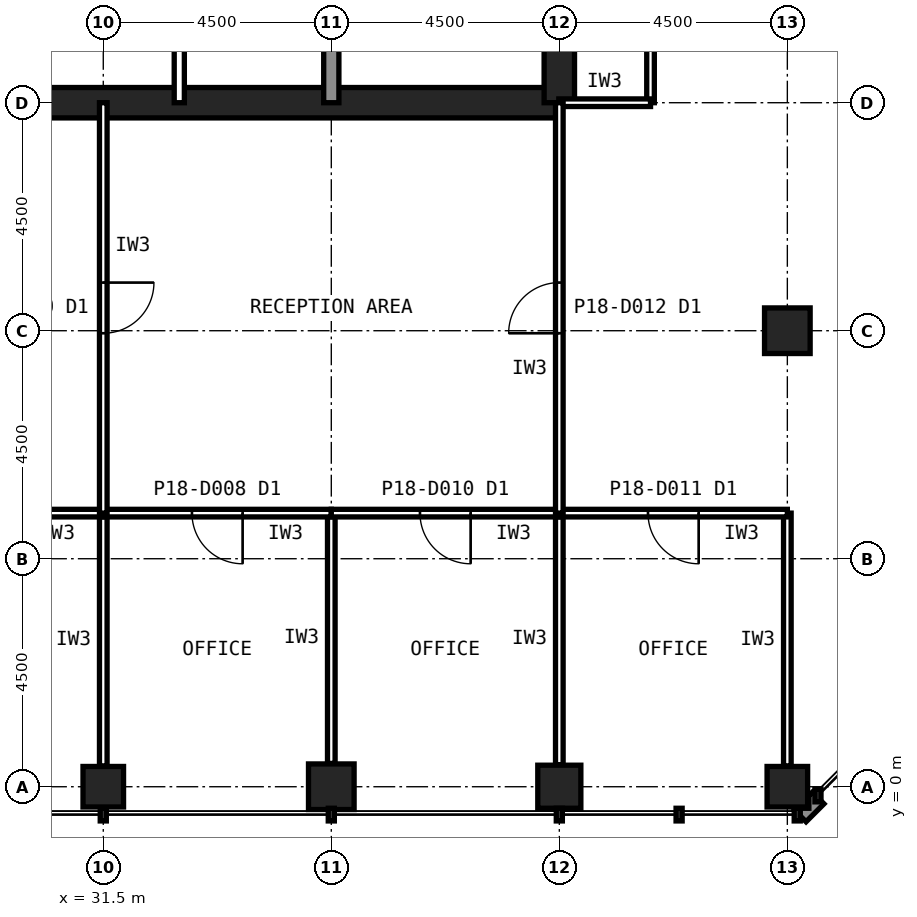
"""IFC4 building model, lengths in metres.
Left out: names, types, materials, properties, quantities, classifications, styles, units other than length and angle.
Written with IfcOpenShell. Run it as: python <this file> out.ifc"""

import sys

from ifc_helpers import new_model, si_unit, direction, frame, frame_2d, origin, origin_2d, place, context, subcontext, project, spatial, rectangle, hollow_rectangle, extrude, element, fill, save


model = new_model("IFC4")
c1 = context("Model", 3, precision=1e-05, world=origin(), true_north=direction((0.0, 1.0)))
c2 = subcontext(c1, "Body", "Model", "MODEL_VIEW")
j1 = project(units=[si_unit("LENGTHUNIT", "METRE"), si_unit("PLANEANGLEUNIT", "RADIAN")], contexts=[c1])
p1 = place(None, origin())
s1 = spatial("IfcSite", under=j1, at=p1, CompositionType="ELEMENT")
p2 = place(p1, origin())
s2 = spatial("IfcBuilding", under=s1, at=p2, CompositionType="ELEMENT")
p3 = place(p2, frame((0.0, 0.0, 79.4)))
s3 = spatial("IfcBuildingStorey", under=s2, at=p3, CompositionType="ELEMENT", Elevation=79.4)
p4 = place(p3, frame((31.5, 0.0, 0.0), z_axis=(0.0, 0.0, 1.0), x_axis=(1.0, 0.0, 0.0)))
e1 = element("IfcColumn", 1, at=p4, inside=s3, PredefinedType="COLUMN", context=c2, shape_type="SweptSolid", body=[
    extrude(hollow_rectangle(XDim=0.8, YDim=0.8, WallThickness=0.045, at=origin_2d()), origin(), (0.0, 0.0, 1.0), 4.2),
])
p5 = place(p3, frame((36.0, 0.0, 0.0), z_axis=(0.0, 0.0, 1.0), x_axis=(1.0, 0.0, 0.0)))
e2 = element("IfcColumn", 2, at=p5, inside=s3, PredefinedType="COLUMN", context=c2, shape_type="SweptSolid", body=[
    extrude(hollow_rectangle(XDim=0.9, YDim=0.9, WallThickness=0.063, at=origin_2d()), origin(), (0.0, 0.0, 1.0), 4.2),
])
p6 = place(p3, frame((40.5, 0.0, 0.0), z_axis=(0.0, 0.0, 1.0), x_axis=(1.0, 0.0, 0.0)))
e3 = element("IfcColumn", 3, at=p6, inside=s3, PredefinedType="COLUMN", context=c2, shape_type="SweptSolid", body=[
    extrude(hollow_rectangle(XDim=0.85, YDim=0.85, WallThickness=0.05, at=origin_2d()), origin(), (0.0, 0.0, 1.0), 4.2),
])
p7 = place(p3, frame((45.0, 0.0, 0.0), z_axis=(0.0, 0.0, 1.0), x_axis=(1.0, 0.0, 0.0)))
e4 = element("IfcColumn", 4, at=p7, inside=s3, PredefinedType="COLUMN", context=c2, shape_type="SweptSolid", body=[
    extrude(hollow_rectangle(XDim=0.8, YDim=0.8, WallThickness=0.045, at=origin_2d()), origin(), (0.0, 0.0, 1.0), 4.2),
])
p8 = place(p3, frame((45.0, 9.0, 0.0), z_axis=(0.0, 0.0, 1.0), x_axis=(1.0, 0.0, 0.0)))
e5 = element("IfcColumn", 5, at=p8, inside=s3, PredefinedType="COLUMN", context=c2, shape_type="SweptSolid", body=[
    extrude(hollow_rectangle(XDim=0.9, YDim=0.9, WallThickness=0.063, at=origin_2d()), origin(), (0.0, 0.0, 1.0), 4.2),
])
p9 = place(p3, frame((13.5, 13.5, 0.0), z_axis=(0.0, 0.0, 1.0), x_axis=(1.0, 0.0, 0.0)))
e6 = element("IfcWall", 6, at=p9, inside=s3, PredefinedType="SHEAR", context=c2, shape_type="SweptSolid", body=[
    extrude(rectangle(XDim=27.0, YDim=0.6, at=frame_2d((13.5, 0.0))), origin(), (0.0, 0.0, 1.0), 4.2),
])
p10 = place(p3, frame((40.5, 13.5, 0.0), z_axis=(0.0, 0.0, 1.0), x_axis=(0.0, 1.0, 0.0)))
e7 = element("IfcWall", 7, at=p10, inside=s3, PredefinedType="SHEAR", context=c2, shape_type="SweptSolid", body=[
    extrude(rectangle(XDim=27.0, YDim=0.6, at=frame_2d((13.5, 0.0))), origin(), (0.0, 0.0, 1.0), 4.2),
])
p11 = place(p10, frame((5.85, 0.0, 0.0)))
e8 = element("IfcOpeningElement", 8, at=p11, cuts=e7, PredefinedType="OPENING", context=c2, shape_type="SweptSolid", body=[
    extrude(rectangle(XDim=1.8, YDim=2.1, at=frame_2d((0.9, 1.05))), frame((0.0, 0.31, 0.0), z_axis=(0.0, -1.0, 0.0), x_axis=(1.0, 0.0, 0.0)), (0.0, 0.0, 1.0), 0.62),
])
p12 = place(p10, frame((19.65, 0.0, 0.0)))
e9 = element("IfcOpeningElement", 9, at=p12, cuts=e7, PredefinedType="OPENING", context=c2, shape_type="SweptSolid", body=[
    extrude(rectangle(XDim=1.2, YDim=2.1, at=frame_2d((0.6, 1.05))), frame((0.0, 0.31, 0.0), z_axis=(0.0, -1.0, 0.0), x_axis=(1.0, 0.0, 0.0)), (0.0, 0.0, 1.0), 0.62),
])
p13 = place(p3, frame((36.0, 13.5, 0.0), z_axis=(0.0, 0.0, 1.0), x_axis=(0.0, 1.0, 0.0)))
e10 = element("IfcWall", 10, at=p13, inside=s3, PredefinedType="SOLIDWALL", context=c2, shape_type="SweptSolid", body=[
    extrude(rectangle(XDim=4.5, YDim=0.3, at=frame_2d((2.25, 0.0))), origin(), (0.0, 0.0, 1.0), 4.04),
])
p14 = place(p3, frame((33.0, 13.5, 0.0), z_axis=(0.0, 0.0, 1.0), x_axis=(0.0, 1.0, 0.0)))
e11 = element("IfcWall", 11, at=p14, inside=s3, PredefinedType="PARTITIONING", context=c2, shape_type="SweptSolid", body=[
    extrude(rectangle(XDim=4.5, YDim=0.2, at=frame_2d((2.25, 0.0))), origin(), (0.0, 0.0, 1.0), 4.04),
])
p15 = place(p3, frame((42.3, 13.5, 0.0), z_axis=(0.0, 0.0, 1.0), x_axis=(0.0, 1.0, 0.0)))
e12 = element("IfcWall", 12, at=p15, inside=s3, PredefinedType="PARTITIONING", context=c2, shape_type="SweptSolid", body=[
    extrude(rectangle(XDim=7.2, YDim=0.15, at=frame_2d((3.6, 0.0))), origin(), (0.0, 0.0, 1.0), 4.04),
])
p16 = place(p3, frame((40.49, 13.5, 0.0), z_axis=(0.0, 0.0, 1.0), x_axis=(1.0, 0.0, 0.0)))
e13 = element("IfcWall", 13, at=p16, inside=s3, PredefinedType="PARTITIONING", context=c2, shape_type="SweptSolid", body=[
    extrude(rectangle(XDim=1.81, YDim=0.15, at=frame_2d((0.905, 0.0))), origin(), (0.0, 0.0, 1.0), 3.189),
])
p17 = place(p3, frame((31.5, 0.41, 0.0), z_axis=(0.0, 0.0, 1.0), x_axis=(0.0, 1.0, 0.0)))
e14 = element("IfcWall", 14, at=p17, inside=s3, PredefinedType="PARTITIONING", context=c2, shape_type="SweptSolid", body=[
    extrude(rectangle(XDim=4.99, YDim=0.15, at=frame_2d((2.495, 0.0))), origin(), (0.0, 0.0, 1.0), 3.189),
])
p18 = place(p3, frame((31.5, 5.4, 0.0), z_axis=(0.0, 0.0, 1.0), x_axis=(-1.0, 0.0, 0.0)))
e15 = element("IfcWall", 15, at=p18, inside=s3, PredefinedType="PARTITIONING", context=c2, shape_type="SweptSolid", body=[
    extrude(rectangle(XDim=4.5, YDim=0.15, at=frame_2d((2.25, 0.0))), origin(), (0.0, 0.0, 1.0), 4.04),
])
p19 = place(p18, frame((1.75, 0.0, 0.0)))
e16 = element("IfcOpeningElement", 16, at=p19, cuts=e15, PredefinedType="OPENING", context=c2, shape_type="SweptSolid", body=[
    extrude(rectangle(XDim=1.0, YDim=2.1, at=frame_2d((0.5, 1.05))), frame((0.0, 0.085, 0.0), z_axis=(0.0, -1.0, 0.0), x_axis=(1.0, 0.0, 0.0)), (0.0, 0.0, 1.0), 0.17),
])
p20 = place(p3, frame((36.0, 0.46, 0.0), z_axis=(0.0, 0.0, 1.0), x_axis=(0.0, 1.0, 0.0)))
e17 = element("IfcWall", 17, at=p20, inside=s3, PredefinedType="PARTITIONING", context=c2, shape_type="SweptSolid", body=[
    extrude(rectangle(XDim=4.94, YDim=0.15, at=frame_2d((2.47, 0.0))), origin(), (0.0, 0.0, 1.0), 3.189),
])
p21 = place(p3, frame((36.0, 5.4, 0.0), z_axis=(0.0, 0.0, 1.0), x_axis=(-1.0, 0.0, 0.0)))
e18 = element("IfcWall", 18, at=p21, inside=s3, PredefinedType="PARTITIONING", context=c2, shape_type="SweptSolid", body=[
    extrude(rectangle(XDim=4.5, YDim=0.15, at=frame_2d((2.25, 0.0))), origin(), (0.0, 0.0, 1.0), 4.04),
])
p22 = place(p21, frame((1.75, 0.0, 0.0)))
e19 = element("IfcOpeningElement", 19, at=p22, cuts=e18, PredefinedType="OPENING", context=c2, shape_type="SweptSolid", body=[
    extrude(rectangle(XDim=1.0, YDim=2.1, at=frame_2d((0.5, 1.05))), frame((0.0, 0.085, 0.0), z_axis=(0.0, -1.0, 0.0), x_axis=(1.0, 0.0, 0.0)), (0.0, 0.0, 1.0), 0.17),
])
p23 = place(p3, frame((40.5, 0.435, 0.0), z_axis=(0.0, 0.0, 1.0), x_axis=(0.0, 1.0, 0.0)))
e20 = element("IfcWall", 20, at=p23, inside=s3, PredefinedType="PARTITIONING", context=c2, shape_type="SweptSolid", body=[
    extrude(rectangle(XDim=4.965, YDim=0.15, at=frame_2d((2.482, 0.0))), origin(), (0.0, 0.0, 1.0), 3.189),
])
p24 = place(p3, frame((40.5, 5.4, 0.0), z_axis=(0.0, 0.0, 1.0), x_axis=(-1.0, 0.0, 0.0)))
e21 = element("IfcWall", 21, at=p24, inside=s3, PredefinedType="PARTITIONING", context=c2, shape_type="SweptSolid", body=[
    extrude(rectangle(XDim=4.5, YDim=0.15, at=frame_2d((2.25, 0.0))), origin(), (0.0, 0.0, 1.0), 4.04),
])
p25 = place(p24, frame((1.75, 0.0, 0.0)))
e22 = element("IfcOpeningElement", 22, at=p25, cuts=e21, PredefinedType="OPENING", context=c2, shape_type="SweptSolid", body=[
    extrude(rectangle(XDim=1.0, YDim=2.1, at=frame_2d((0.5, 1.05))), frame((0.0, 0.085, 0.0), z_axis=(0.0, -1.0, 0.0), x_axis=(1.0, 0.0, 0.0)), (0.0, 0.0, 1.0), 0.17),
])
p26 = place(p3, frame((45.0, 0.41, 0.0), z_axis=(0.0, 0.0, 1.0), x_axis=(0.0, 1.0, 0.0)))
e23 = element("IfcWall", 23, at=p26, inside=s3, PredefinedType="PARTITIONING", context=c2, shape_type="SweptSolid", body=[
    extrude(rectangle(XDim=4.99, YDim=0.15, at=frame_2d((2.495, 0.0))), origin(), (0.0, 0.0, 1.0), 3.429),
])
p27 = place(p3, frame((45.0, 5.4, 0.0), z_axis=(0.0, 0.0, 1.0), x_axis=(-1.0, 0.0, 0.0)))
e24 = element("IfcWall", 24, at=p27, inside=s3, PredefinedType="PARTITIONING", context=c2, shape_type="SweptSolid", body=[
    extrude(rectangle(XDim=4.5, YDim=0.15, at=frame_2d((2.25, 0.0))), origin(), (0.0, 0.0, 1.0), 4.04),
])
p28 = place(p27, frame((1.75, 0.0, 0.0)))
e25 = element("IfcOpeningElement", 25, at=p28, cuts=e24, PredefinedType="OPENING", context=c2, shape_type="SweptSolid", body=[
    extrude(rectangle(XDim=1.0, YDim=2.1, at=frame_2d((0.5, 1.05))), frame((0.0, 0.085, 0.0), z_axis=(0.0, -1.0, 0.0), x_axis=(1.0, 0.0, 0.0)), (0.0, 0.0, 1.0), 0.17),
])
p29 = place(p3, frame((40.5, 5.4, 0.0), z_axis=(0.0, 0.0, 1.0), x_axis=(0.0, 1.0, 0.0)))
e26 = element("IfcWall", 26, at=p29, inside=s3, PredefinedType="PARTITIONING", context=c2, shape_type="SweptSolid", body=[
    extrude(rectangle(XDim=8.1, YDim=0.15, at=frame_2d((4.05, 0.0))), origin(), (0.0, 0.0, 1.0), 3.189),
])
p30 = place(p29, frame((3.55, 0.0, 0.0)))
e27 = element("IfcOpeningElement", 27, at=p30, cuts=e26, PredefinedType="OPENING", context=c2, shape_type="SweptSolid", body=[
    extrude(rectangle(XDim=1.0, YDim=2.1, at=frame_2d((0.5, 1.05))), frame((0.0, 0.085, 0.0), z_axis=(0.0, -1.0, 0.0), x_axis=(1.0, 0.0, 0.0)), (0.0, 0.0, 1.0), 0.17),
])
p31 = place(p3, frame((31.5, 13.5, 0.0), z_axis=(0.0, 0.0, 1.0), x_axis=(0.0, -1.0, 0.0)))
e28 = element("IfcWall", 28, at=p31, inside=s3, PredefinedType="PARTITIONING", context=c2, shape_type="SweptSolid", body=[
    extrude(rectangle(XDim=8.1, YDim=0.15, at=frame_2d((4.05, 0.0))), origin(), (0.0, 0.0, 1.0), 3.189),
])
p32 = place(p31, frame((3.55, 0.0, 0.0)))
e29 = element("IfcOpeningElement", 29, at=p32, cuts=e28, PredefinedType="OPENING", context=c2, shape_type="SweptSolid", body=[
    extrude(rectangle(XDim=1.0, YDim=2.1, at=frame_2d((0.5, 1.05))), frame((0.0, 0.085, 0.0), z_axis=(0.0, -1.0, 0.0), x_axis=(1.0, 0.0, 0.0)), (0.0, 0.0, 1.0), 0.17),
])
p33 = place(p22, origin())
e30 = element("IfcDoor", 30, at=p33, inside=s3, OperationType="SINGLE_SWING_LEFT", PredefinedType="DOOR", context=c2, shape_type="SweptSolid", body=[
    extrude(rectangle(XDim=1.0, YDim=2.1, at=frame_2d((0.5, 1.05))), frame((0.0, 0.025, 0.0), z_axis=(0.0, -1.0, 0.0), x_axis=(1.0, 0.0, 0.0)), (0.0, 0.0, 1.0), 0.05),
])
fill(e19, e30)
p34 = place(p25, origin())
e31 = element("IfcDoor", 31, at=p34, inside=s3, OperationType="SINGLE_SWING_LEFT", PredefinedType="DOOR", context=c2, shape_type="SweptSolid", body=[
    extrude(rectangle(XDim=1.0, YDim=2.1, at=frame_2d((0.5, 1.05))), frame((0.0, 0.025, 0.0), z_axis=(0.0, -1.0, 0.0), x_axis=(1.0, 0.0, 0.0)), (0.0, 0.0, 1.0), 0.05),
])
fill(e22, e31)
p35 = place(p28, origin())
e32 = element("IfcDoor", 32, at=p35, inside=s3, OperationType="SINGLE_SWING_LEFT", PredefinedType="DOOR", context=c2, shape_type="SweptSolid", body=[
    extrude(rectangle(XDim=1.0, YDim=2.1, at=frame_2d((0.5, 1.05))), frame((0.0, 0.025, 0.0), z_axis=(0.0, -1.0, 0.0), x_axis=(1.0, 0.0, 0.0)), (0.0, 0.0, 1.0), 0.05),
])
fill(e25, e32)
p36 = place(p30, origin())
e33 = element("IfcDoor", 33, at=p36, inside=s3, OperationType="SINGLE_SWING_LEFT", PredefinedType="DOOR", context=c2, shape_type="SweptSolid", body=[
    extrude(rectangle(XDim=1.0, YDim=2.1, at=frame_2d((0.5, 1.05))), frame((0.0, 0.025, 0.0), z_axis=(0.0, -1.0, 0.0), x_axis=(1.0, 0.0, 0.0)), (0.0, 0.0, 1.0), 0.05),
])
fill(e27, e33)
p37 = place(p32, origin())
e34 = element("IfcDoor", 34, at=p37, inside=s3, OperationType="SINGLE_SWING_LEFT", PredefinedType="DOOR", context=c2, shape_type="SweptSolid", body=[
    extrude(rectangle(XDim=1.0, YDim=2.1, at=frame_2d((0.5, 1.05))), frame((0.0, 0.025, 0.0), z_axis=(0.0, -1.0, 0.0), x_axis=(1.0, 0.0, 0.0)), (0.0, 0.0, 1.0), 0.05),
])
fill(e29, e34)
save(model, sys.argv[1])
